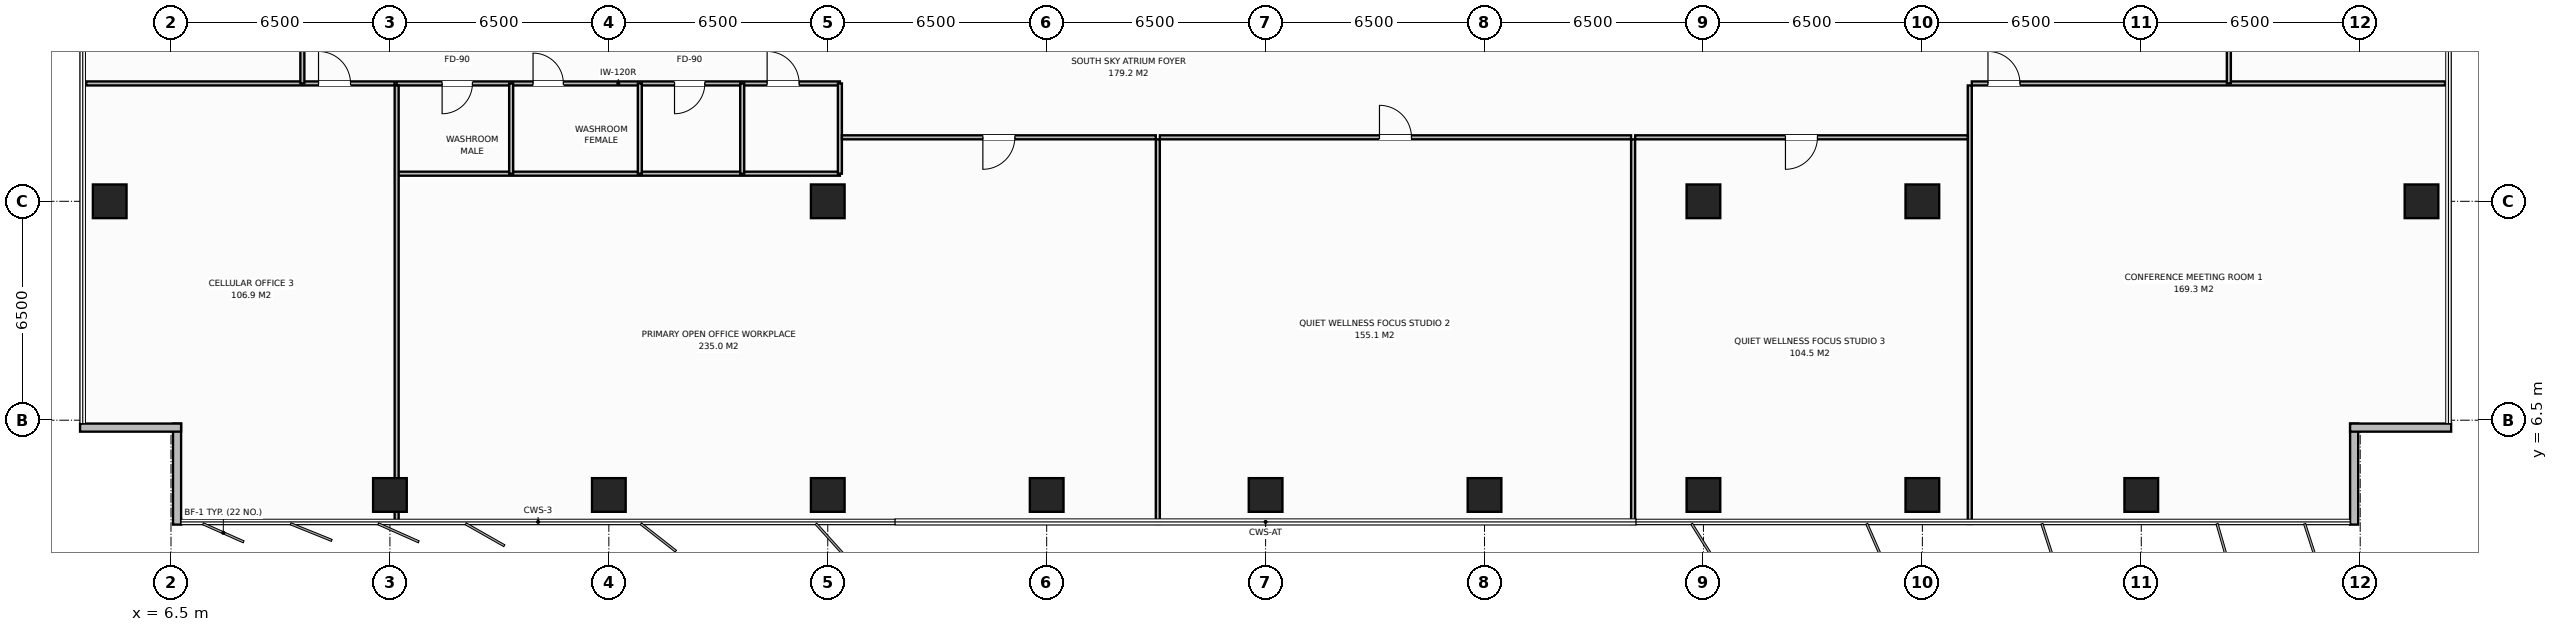
"""IFC4 building model, lengths in metres.
Left out: names, types, materials, properties, quantities, classifications, styles, units other than length and angle.
Written with IfcOpenShell. Run it as: python <this file> out.ifc"""

import sys

from ifc_helpers import new_model, si_unit, direction, frame, frame_2d, origin, origin_2d, place, context, subcontext, project, spatial, rectangle, extrude, element, fill, save


model = new_model("IFC4")
c1 = context("Model", 3, precision=1e-05, world=origin(), true_north=direction((0.0, 1.0)))
c2 = subcontext(c1, "Body", "Model", "MODEL_VIEW")
j1 = project(units=[si_unit("LENGTHUNIT", "METRE"), si_unit("PLANEANGLEUNIT", "RADIAN")], contexts=[c1])
p1 = place(None, origin())
s1 = spatial("IfcSite", under=j1, at=p1, CompositionType="ELEMENT")
p2 = place(p1, origin())
s2 = spatial("IfcBuilding", under=s1, at=p2, CompositionType="ELEMENT")
p3 = place(p2, frame((0.0, 0.0, 151.8)))
s3 = spatial("IfcBuildingStorey", under=s2, at=p3, CompositionType="ELEMENT", Elevation=151.8)
for number, where, z_axis, x_axis in (
    (1, (58.5, 13.0, 0.0), (0.0, 0.0, 1.0), (1.0, 0.0, 0.0)),
    (2, (26.0, 13.0, 0.0), (0.0, 0.0, 1.0), (1.0, 0.0, 0.0)),
    (3, (52.0, 13.0, 0.0), (0.0, 0.0, 1.0), (1.0, 0.0, 0.0)),
    (4, (13.0, 4.28, 0.0), (0.0, 0.0, 1.0), (1.0, 0.0, 0.0)),
    (5, (19.5, 4.28, 0.0), (0.0, 0.0, 1.0), (1.0, 0.0, 0.0)),
    (6, (26.0, 4.28, 0.0), (0.0, 0.0, 1.0), (1.0, 0.0, 0.0)),
    (7, (32.5, 4.28, 0.0), (0.0, 0.0, 1.0), (1.0, 0.0, 0.0)),
    (8, (39.0, 4.28, 0.0), (0.0, 0.0, 1.0), (1.0, 0.0, 0.0)),
    (9, (45.5, 4.28, 0.0), (0.0, 0.0, 1.0), (1.0, 0.0, 0.0)),
    (10, (52.0, 4.28, 0.0), (0.0, 0.0, 1.0), (1.0, 0.0, 0.0)),
    (11, (58.5, 4.28, 0.0), (0.0, 0.0, 1.0), (1.0, 0.0, 0.0)),
    (12, (65.0, 4.28, 0.0), (0.0, 0.0, 1.0), (1.0, 0.0, 0.0)),
    (13, (4.68, 13.0, 0.0), (0.0, 0.0, 1.0), (1.0, 0.0, 0.0)),
    (14, (73.32, 13.0, 0.0), (0.0, 0.0, 1.0), (1.0, 0.0, 0.0)),
):
    element("IfcColumn", number, at=place(p3, frame(where, z_axis=z_axis, x_axis=x_axis)), inside=s3, PredefinedType="COLUMN", context=c2, shape_type="SweptSolid", body=[
        extrude(rectangle(XDim=1.0, YDim=1.0, at=origin_2d()), origin(), (0.0, 0.0, 1.0), 3.8),
    ])
for number, where, z_axis, x_axis in (
    (15, (6.68, 3.4, 0.0), (0.0, 0.0, 1.0), (0.0, 1.0, 0.0)),
    (16, (6.8, 6.28, 0.0), (0.0, 0.0, 1.0), (-1.0, 0.0, 0.0)),
    (17, (71.32, 6.4, 0.0), (0.0, 0.0, 1.0), (0.0, -1.0, 0.0)),
    (18, (74.2, 6.28, 0.0), (0.0, 0.0, 1.0), (-1.0, 0.0, 0.0)),
):
    element("IfcWall", number, at=place(p3, frame(where, z_axis=z_axis, x_axis=x_axis)), inside=s3, PredefinedType="STANDARD", context=c2, shape_type="SweptSolid", body=[
        extrude(rectangle(XDim=3.0, YDim=0.24, at=frame_2d((1.5, 0.0))), origin(), (0.0, 0.0, 1.0), 3.572),
    ])
p4 = place(p3, frame((13.2, 16.5, 0.0), z_axis=(0.0, 0.0, 1.0), x_axis=(1.0, 0.0, 0.0)))
e19 = element("IfcWall", 19, at=p4, inside=s3, PredefinedType="PARTITIONING", context=c2, shape_type="SweptSolid", body=[
    extrude(rectangle(XDim=13.16, YDim=0.12, at=frame_2d((6.58, 0.0))), origin(), (0.0, 0.0, 1.0), 3.572),
])
p5 = place(p4, frame((1.35, 0.0, 0.0)))
e20 = element("IfcOpeningElement", 20, at=p5, cuts=e19, PredefinedType="OPENING", context=c2, shape_type="SweptSolid", body=[
    extrude(rectangle(XDim=0.9, YDim=2.15, at=frame_2d((0.45, 1.075))), frame((0.0, 0.07, 0.0), z_axis=(0.0, -1.0, 0.0), x_axis=(1.0, 0.0, 0.0)), (0.0, 0.0, 1.0), 0.14),
])
p6 = place(p4, frame((4.05, 0.0, 0.0)))
e21 = element("IfcOpeningElement", 21, at=p6, cuts=e19, PredefinedType="OPENING", context=c2, shape_type="SweptSolid", body=[
    extrude(rectangle(XDim=0.9, YDim=2.15, at=frame_2d((0.45, 1.075))), frame((0.0, 0.07, 0.0), z_axis=(0.0, -1.0, 0.0), x_axis=(1.0, 0.0, 0.0)), (0.0, 0.0, 1.0), 0.14),
])
p7 = place(p4, frame((8.25, 0.0, 0.0)))
e22 = element("IfcOpeningElement", 22, at=p7, cuts=e19, PredefinedType="OPENING", context=c2, shape_type="SweptSolid", body=[
    extrude(rectangle(XDim=0.9, YDim=2.15, at=frame_2d((0.45, 1.075))), frame((0.0, 0.07, 0.0), z_axis=(0.0, -1.0, 0.0), x_axis=(1.0, 0.0, 0.0)), (0.0, 0.0, 1.0), 0.14),
])
p8 = place(p4, frame((11.0, 0.0, 0.0)))
e23 = element("IfcOpeningElement", 23, at=p8, cuts=e19, PredefinedType="OPENING", context=c2, shape_type="SweptSolid", body=[
    extrude(rectangle(XDim=0.95, YDim=2.15, at=frame_2d((0.475, 1.075))), frame((0.0, 0.07, 0.0), z_axis=(0.0, -1.0, 0.0), x_axis=(1.0, 0.0, 0.0)), (0.0, 0.0, 1.0), 0.14),
])
p9 = place(p3, frame((13.2, 13.82, 0.0), z_axis=(0.0, 0.0, 1.0), x_axis=(1.0, 0.0, 0.0)))
e24 = element("IfcWall", 24, at=p9, inside=s3, PredefinedType="PARTITIONING", context=c2, shape_type="SweptSolid", body=[
    extrude(rectangle(XDim=13.16, YDim=0.12, at=frame_2d((6.58, 0.0))), origin(), (0.0, 0.0, 1.0), 3.572),
])
for number, where, z_axis, x_axis in (
    (25, (16.6, 13.82, 0.0), (0.0, 0.0, 1.0), (0.0, 1.0, 0.0)),
    (26, (20.42, 13.82, 0.0), (0.0, 0.0, 1.0), (0.0, 1.0, 0.0)),
    (27, (23.46, 13.82, 0.0), (0.0, 0.0, 1.0), (0.0, 1.0, 0.0)),
    (28, (26.36, 13.82, 0.0), (0.0, 0.0, 1.0), (0.0, 1.0, 0.0)),
):
    element("IfcWall", number, at=place(p3, frame(where, z_axis=z_axis, x_axis=x_axis)), inside=s3, PredefinedType="PARTITIONING", context=c2, shape_type="SweptSolid", body=[
        extrude(rectangle(XDim=2.68, YDim=0.12, at=frame_2d((1.34, 0.0))), origin(), (0.0, 0.0, 1.0), 3.572),
    ])
p10 = place(p3, frame((13.2, 3.42, 0.0), z_axis=(0.0, 0.0, 1.0), x_axis=(0.0, 1.0, 0.0)))
e29 = element("IfcWall", 29, at=p10, inside=s3, PredefinedType="PARTITIONING", context=c2, shape_type="SweptSolid", body=[
    extrude(rectangle(XDim=13.02, YDim=0.12, at=frame_2d((6.51, 0.0))), origin(), (0.0, 0.0, 1.0), 3.022),
])
p11 = place(p3, frame((3.98, 16.5, 0.0), z_axis=(0.0, 0.0, 1.0), x_axis=(1.0, 0.0, 0.0)))
e30 = element("IfcWall", 30, at=p11, inside=s3, PredefinedType="PARTITIONING", context=c2, shape_type="SweptSolid", body=[
    extrude(rectangle(XDim=9.16, YDim=0.12, at=frame_2d((4.58, 0.0))), origin(), (0.0, 0.0, 1.0), 3.572),
])
p12 = place(p11, frame((6.9, 0.0, 0.0)))
e31 = element("IfcOpeningElement", 31, at=p12, cuts=e30, PredefinedType="OPENING", context=c2, shape_type="SweptSolid", body=[
    extrude(rectangle(XDim=0.95, YDim=2.15, at=frame_2d((0.475, 1.075))), frame((0.0, 0.07, 0.0), z_axis=(0.0, -1.0, 0.0), x_axis=(1.0, 0.0, 0.0)), (0.0, 0.0, 1.0), 0.14),
])
p13 = place(p3, frame((35.8, 3.42, 0.0), z_axis=(0.0, 0.0, 1.0), x_axis=(0.0, 1.0, 0.0)))
e32 = element("IfcWall", 32, at=p13, inside=s3, PredefinedType="PARTITIONING", context=c2, shape_type="SweptSolid", body=[
    extrude(rectangle(XDim=11.42, YDim=0.12, at=frame_2d((5.71, 0.0))), origin(), (0.0, 0.0, 1.0), 3.572),
])
p14 = place(p3, frame((26.42, 14.9, 0.0), z_axis=(0.0, 0.0, 1.0), x_axis=(1.0, 0.0, 0.0)))
e33 = element("IfcWall", 33, at=p14, inside=s3, PredefinedType="PARTITIONING", context=c2, shape_type="SweptSolid", body=[
    extrude(rectangle(XDim=9.32, YDim=0.12, at=frame_2d((4.66, 0.0))), origin(), (0.0, 0.0, 1.0), 3.572),
])
p15 = place(p14, frame((4.185, 0.0, 0.0)))
e34 = element("IfcOpeningElement", 34, at=p15, cuts=e33, PredefinedType="OPENING", context=c2, shape_type="SweptSolid", body=[
    extrude(rectangle(XDim=0.95, YDim=2.15, at=frame_2d((0.475, 1.075))), frame((0.0, 0.07, 0.0), z_axis=(0.0, -1.0, 0.0), x_axis=(1.0, 0.0, 0.0)), (0.0, 0.0, 1.0), 0.14),
])
p16 = place(p3, frame((49.912, 3.42, 0.0), z_axis=(0.0, 0.0, 1.0), x_axis=(0.0, 1.0, 0.0)))
e35 = element("IfcWall", 35, at=p16, inside=s3, PredefinedType="PARTITIONING", context=c2, shape_type="SweptSolid", body=[
    extrude(rectangle(XDim=11.42, YDim=0.12, at=frame_2d((5.71, 0.0))), origin(), (0.0, 0.0, 1.0), 3.572),
])
p17 = place(p3, frame((35.86, 14.9, 0.0), z_axis=(0.0, 0.0, 1.0), x_axis=(1.0, 0.0, 0.0)))
e36 = element("IfcWall", 36, at=p17, inside=s3, PredefinedType="PARTITIONING", context=c2, shape_type="SweptSolid", body=[
    extrude(rectangle(XDim=13.992, YDim=0.12, at=frame_2d((6.996, 0.0))), origin(), (0.0, 0.0, 1.0), 3.572),
])
p18 = place(p17, frame((6.521, 0.0, 0.0)))
e37 = element("IfcOpeningElement", 37, at=p18, cuts=e36, PredefinedType="OPENING", context=c2, shape_type="SweptSolid", body=[
    extrude(rectangle(XDim=0.95, YDim=2.15, at=frame_2d((0.475, 1.075))), frame((0.0, 0.07, 0.0), z_axis=(0.0, -1.0, 0.0), x_axis=(1.0, 0.0, 0.0)), (0.0, 0.0, 1.0), 0.14),
])
p19 = place(p3, frame((59.908, 3.42, 0.0), z_axis=(0.0, 0.0, 1.0), x_axis=(0.0, 1.0, 0.0)))
e38 = element("IfcWall", 38, at=p19, inside=s3, PredefinedType="PARTITIONING", context=c2, shape_type="SweptSolid", body=[
    extrude(rectangle(XDim=13.02, YDim=0.12, at=frame_2d((6.51, 0.0))), origin(), (0.0, 0.0, 1.0), 3.572),
])
p20 = place(p3, frame((49.972, 14.9, 0.0), z_axis=(0.0, 0.0, 1.0), x_axis=(1.0, 0.0, 0.0)))
e39 = element("IfcWall", 39, at=p20, inside=s3, PredefinedType="PARTITIONING", context=c2, shape_type="SweptSolid", body=[
    extrude(rectangle(XDim=9.876, YDim=0.12, at=frame_2d((4.938, 0.0))), origin(), (0.0, 0.0, 1.0), 3.572),
])
p21 = place(p20, frame((4.463, 0.0, 0.0)))
e40 = element("IfcOpeningElement", 40, at=p21, cuts=e39, PredefinedType="OPENING", context=c2, shape_type="SweptSolid", body=[
    extrude(rectangle(XDim=0.95, YDim=2.15, at=frame_2d((0.475, 1.075))), frame((0.0, 0.07, 0.0), z_axis=(0.0, -1.0, 0.0), x_axis=(1.0, 0.0, 0.0)), (0.0, 0.0, 1.0), 0.14),
])
p22 = place(p3, frame((59.968, 16.5, 0.0), z_axis=(0.0, 0.0, 1.0), x_axis=(1.0, 0.0, 0.0)))
e41 = element("IfcWall", 41, at=p22, inside=s3, PredefinedType="PARTITIONING", context=c2, shape_type="SweptSolid", body=[
    extrude(rectangle(XDim=14.052, YDim=0.12, at=frame_2d((7.026, 0.0))), origin(), (0.0, 0.0, 1.0), 3.572),
])
p23 = place(p22, frame((0.48, 0.0, 0.0)))
e42 = element("IfcOpeningElement", 42, at=p23, cuts=e41, PredefinedType="OPENING", context=c2, shape_type="SweptSolid", body=[
    extrude(rectangle(XDim=0.95, YDim=2.15, at=frame_2d((0.475, 1.075))), frame((0.0, 0.07, 0.0), z_axis=(0.0, -1.0, 0.0), x_axis=(1.0, 0.0, 0.0)), (0.0, 0.0, 1.0), 0.14),
])
p24 = place(p3, frame((10.4, 16.5, 0.0), z_axis=(0.0, 0.0, 1.0), x_axis=(0.0, 1.0, 0.0)))
e43 = element("IfcWall", 43, at=p24, inside=s3, PredefinedType="PARTITIONING", context=c2, shape_type="SweptSolid", body=[
    extrude(rectangle(XDim=6.333, YDim=0.12, at=frame_2d((3.167, 0.0))), origin(), (0.0, 0.0, 1.0), 3.572),
])
p25 = place(p24, frame((3.742, 0.0, 0.0)))
e44 = element("IfcOpeningElement", 44, at=p25, cuts=e43, PredefinedType="OPENING", context=c2, shape_type="SweptSolid", body=[
    extrude(rectangle(XDim=0.95, YDim=2.15, at=frame_2d((0.475, 1.075))), frame((0.0, 0.07, 0.0), z_axis=(0.0, -1.0, 0.0), x_axis=(1.0, 0.0, 0.0)), (0.0, 0.0, 1.0), 0.14),
])
p26 = place(p3, frame((67.6, 16.5, 0.0), z_axis=(0.0, 0.0, 1.0), x_axis=(0.0, 1.0, 0.0)))
e45 = element("IfcWall", 45, at=p26, inside=s3, PredefinedType="PARTITIONING", context=c2, shape_type="SweptSolid", body=[
    extrude(rectangle(XDim=19.0, YDim=0.12, at=frame_2d((9.5, 0.0))), origin(), (0.0, 0.0, 1.0), 3.572),
])
p27 = place(p26, frame((9.025, 0.0, 0.0)))
e46 = element("IfcOpeningElement", 46, at=p27, cuts=e45, PredefinedType="OPENING", context=c2, shape_type="SweptSolid", body=[
    extrude(rectangle(XDim=0.95, YDim=2.15, at=frame_2d((0.475, 1.075))), frame((0.0, 0.07, 0.0), z_axis=(0.0, -1.0, 0.0), x_axis=(1.0, 0.0, 0.0)), (0.0, 0.0, 1.0), 0.14),
])
p28 = place(p5, origin())
e47 = element("IfcDoor", 47, at=p28, inside=s3, OperationType="SINGLE_SWING_RIGHT", PredefinedType="DOOR", context=c2, shape_type="SweptSolid", body=[
    extrude(rectangle(XDim=0.9, YDim=2.15, at=frame_2d((0.45, 1.075))), frame((0.0, 0.025, 0.0), z_axis=(0.0, -1.0, 0.0), x_axis=(1.0, 0.0, 0.0)), (0.0, 0.0, 1.0), 0.05),
])
fill(e20, e47)
p29 = place(p6, origin())
e48 = element("IfcDoor", 48, at=p29, inside=s3, OperationType="SINGLE_SWING_LEFT", PredefinedType="DOOR", context=c2, shape_type="SweptSolid", body=[
    extrude(rectangle(XDim=0.9, YDim=2.15, at=frame_2d((0.45, 1.075))), frame((0.0, 0.025, 0.0), z_axis=(0.0, -1.0, 0.0), x_axis=(1.0, 0.0, 0.0)), (0.0, 0.0, 1.0), 0.05),
])
fill(e21, e48)
p30 = place(p7, origin())
e49 = element("IfcDoor", 49, at=p30, inside=s3, OperationType="SINGLE_SWING_RIGHT", PredefinedType="DOOR", context=c2, shape_type="SweptSolid", body=[
    extrude(rectangle(XDim=0.9, YDim=2.15, at=frame_2d((0.45, 1.075))), frame((0.0, 0.025, 0.0), z_axis=(0.0, -1.0, 0.0), x_axis=(1.0, 0.0, 0.0)), (0.0, 0.0, 1.0), 0.05),
])
fill(e22, e49)
p31 = place(p8, origin())
e50 = element("IfcDoor", 50, at=p31, inside=s3, OperationType="SINGLE_SWING_LEFT", PredefinedType="DOOR", context=c2, shape_type="SweptSolid", body=[
    extrude(rectangle(XDim=0.95, YDim=2.15, at=frame_2d((0.475, 1.075))), frame((0.0, 0.025, 0.0), z_axis=(0.0, -1.0, 0.0), x_axis=(1.0, 0.0, 0.0)), (0.0, 0.0, 1.0), 0.05),
])
fill(e23, e50)
p32 = place(p12, origin())
e51 = element("IfcDoor", 51, at=p32, inside=s3, OperationType="SINGLE_SWING_LEFT", PredefinedType="DOOR", context=c2, shape_type="SweptSolid", body=[
    extrude(rectangle(XDim=0.95, YDim=2.15, at=frame_2d((0.475, 1.075))), frame((0.0, 0.025, 0.0), z_axis=(0.0, -1.0, 0.0), x_axis=(1.0, 0.0, 0.0)), (0.0, 0.0, 1.0), 0.05),
])
fill(e31, e51)
p33 = place(p15, origin())
e52 = element("IfcDoor", 52, at=p33, inside=s3, OperationType="SINGLE_SWING_RIGHT", PredefinedType="DOOR", context=c2, shape_type="SweptSolid", body=[
    extrude(rectangle(XDim=0.95, YDim=2.15, at=frame_2d((0.475, 1.075))), frame((0.0, 0.025, 0.0), z_axis=(0.0, -1.0, 0.0), x_axis=(1.0, 0.0, 0.0)), (0.0, 0.0, 1.0), 0.05),
])
fill(e34, e52)
p34 = place(p18, origin())
e53 = element("IfcDoor", 53, at=p34, inside=s3, OperationType="SINGLE_SWING_LEFT", PredefinedType="DOOR", context=c2, shape_type="SweptSolid", body=[
    extrude(rectangle(XDim=0.95, YDim=2.15, at=frame_2d((0.475, 1.075))), frame((0.0, 0.025, 0.0), z_axis=(0.0, -1.0, 0.0), x_axis=(1.0, 0.0, 0.0)), (0.0, 0.0, 1.0), 0.05),
])
fill(e37, e53)
p35 = place(p21, origin())
e54 = element("IfcDoor", 54, at=p35, inside=s3, OperationType="SINGLE_SWING_RIGHT", PredefinedType="DOOR", context=c2, shape_type="SweptSolid", body=[
    extrude(rectangle(XDim=0.95, YDim=2.15, at=frame_2d((0.475, 1.075))), frame((0.0, 0.025, 0.0), z_axis=(0.0, -1.0, 0.0), x_axis=(1.0, 0.0, 0.0)), (0.0, 0.0, 1.0), 0.05),
])
fill(e40, e54)
p36 = place(p23, origin())
e55 = element("IfcDoor", 55, at=p36, inside=s3, OperationType="SINGLE_SWING_LEFT", PredefinedType="DOOR", context=c2, shape_type="SweptSolid", body=[
    extrude(rectangle(XDim=0.95, YDim=2.15, at=frame_2d((0.475, 1.075))), frame((0.0, 0.025, 0.0), z_axis=(0.0, -1.0, 0.0), x_axis=(1.0, 0.0, 0.0)), (0.0, 0.0, 1.0), 0.05),
])
fill(e42, e55)
save(model, sys.argv[1])
